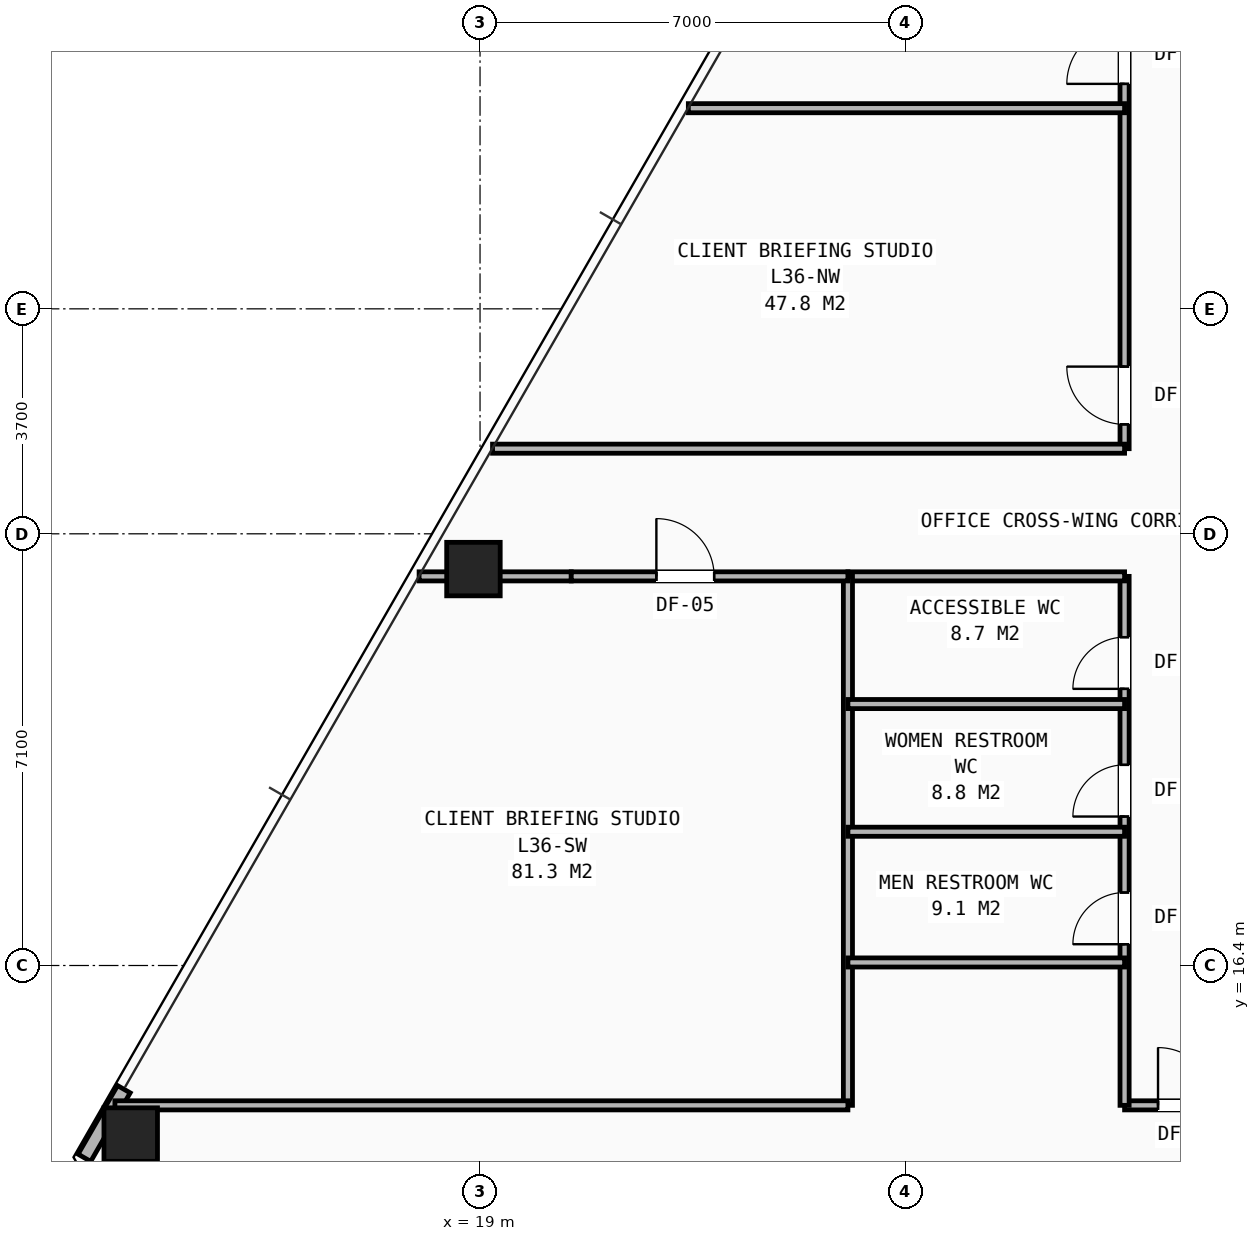
"""IFC4 building model, lengths in metres.
Left out: names, types, materials, properties, quantities, classifications, styles, units other than length and angle.
Written with IfcOpenShell. Run it as: python <this file> out.ifc"""

import sys

from ifc_helpers import new_model, si_unit, direction, frame, frame_2d, origin, origin_2d, place, context, subcontext, project, spatial, rectangle, hollow_rectangle, extrude, element, fill, save


model = new_model("IFC4")
c1 = context("Model", 3, precision=1e-05, world=origin(), true_north=direction((0.0, 1.0)))
c2 = subcontext(c1, "Body", "Model", "MODEL_VIEW")
j1 = project(units=[si_unit("LENGTHUNIT", "METRE"), si_unit("PLANEANGLEUNIT", "RADIAN")], contexts=[c1])
p1 = place(None, origin())
s1 = spatial("IfcSite", under=j1, at=p1, CompositionType="ELEMENT")
p2 = place(p1, origin())
s2 = spatial("IfcBuilding", under=s1, at=p2, CompositionType="ELEMENT")
p3 = place(p2, frame((0.0, 0.0, 126.35)))
s3 = spatial("IfcBuildingStorey", under=s2, at=p3, CompositionType="ELEMENT", Elevation=126.35)
for number, where, z_axis, x_axis in (
    (1, (18.892, 22.92, 0.0), (0.0, 0.0, 1.0), (1.0, 0.0, 0.0)),
    (2, (13.255, 13.619, 0.0), (0.0, 0.0, 1.0), (1.0, 0.0, 0.0)),
):
    element("IfcColumn", number, at=place(p3, frame(where, z_axis=z_axis, x_axis=x_axis)), inside=s3, PredefinedType="COLUMN", context=c2, shape_type="SweptSolid", body=[
        extrude(hollow_rectangle(XDim=0.88, YDim=0.88, WallThickness=0.06, at=origin_2d()), origin(), (0.0, 0.0, 1.0), 3.45),
    ])
p4 = place(p3, frame((13.142, 14.365, 0.0), z_axis=(0.0, 0.0, 1.0), x_axis=(-0.498460550087, -0.86691238312, 0.0)))
e3 = element("IfcWall", 3, at=p4, inside=s3, PredefinedType="SHEAR", context=c2, shape_type="SweptSolid", body=[
    extrude(rectangle(XDim=1.301, YDim=0.24, at=frame_2d((0.651, 0.0))), origin(), (0.0, 0.0, 1.0), 2.583),
])
p5 = place(p3, frame((29.6, 14.1, 0.0), z_axis=(0.0, 0.0, 1.0), x_axis=(1.0, 0.0, 0.0)))
e4 = element("IfcWall", 4, at=p5, inside=s3, PredefinedType="PARTITIONING", context=c2, shape_type="SweptSolid", body=[
    extrude(rectangle(XDim=18.6, YDim=0.15, at=frame_2d((9.3, 0.0))), origin(), (0.0, 0.0, 1.0), 2.225),
])
p6 = place(p5, frame((0.55, 0.0, 0.0)))
e5 = element("IfcOpeningElement", 5, at=p6, cuts=e4, PredefinedType="OPENING", context=c2, shape_type="SweptSolid", body=[
    extrude(rectangle(XDim=0.95, YDim=2.1, at=frame_2d((0.475, 1.05))), frame((0.0, 0.085, 0.0), z_axis=(0.0, -1.0, 0.0), x_axis=(1.0, 0.0, 0.0)), (0.0, 0.0, 1.0), 0.17),
])
p7 = place(p5, frame((7.25, 0.0, 0.0)))
e6 = element("IfcOpeningElement", 6, at=p7, cuts=e4, PredefinedType="OPENING", context=c2, shape_type="SweptSolid", body=[
    extrude(rectangle(XDim=0.95, YDim=2.1, at=frame_2d((0.475, 1.05))), frame((0.0, 0.085, 0.0), z_axis=(0.0, -1.0, 0.0), x_axis=(1.0, 0.0, 0.0)), (0.0, 0.0, 1.0), 0.17),
])
p8 = place(p5, frame((13.75, 0.0, 0.0)))
e7 = element("IfcOpeningElement", 7, at=p8, cuts=e4, PredefinedType="OPENING", context=c2, shape_type="SweptSolid", body=[
    extrude(rectangle(XDim=0.95, YDim=2.1, at=frame_2d((0.475, 1.05))), frame((0.0, 0.085, 0.0), z_axis=(0.0, -1.0, 0.0), x_axis=(1.0, 0.0, 0.0)), (0.0, 0.0, 1.0), 0.17),
])
p9 = place(p3, frame((29.6, 14.1, 0.0), z_axis=(0.0, 0.0, 1.0), x_axis=(0.0, 1.0, 0.0)))
e8 = element("IfcWall", 8, at=p9, inside=s3, PredefinedType="PARTITIONING", context=c2, shape_type="SweptSolid", body=[
    extrude(rectangle(XDim=8.7, YDim=0.15, at=frame_2d((4.35, 0.0))), origin(), (0.0, 0.0, 1.0), 3.21),
])
p10 = place(p9, frame((2.65, 0.0, 0.0)))
e9 = element("IfcOpeningElement", 9, at=p10, cuts=e8, PredefinedType="OPENING", context=c2, shape_type="SweptSolid", body=[
    extrude(rectangle(XDim=0.85, YDim=2.05, at=frame_2d((0.425, 1.025))), frame((0.0, 0.085, 0.0), z_axis=(0.0, -1.0, 0.0), x_axis=(1.0, 0.0, 0.0)), (0.0, 0.0, 1.0), 0.17),
])
p11 = place(p9, frame((4.75, 0.0, 0.0)))
e10 = element("IfcOpeningElement", 10, at=p11, cuts=e8, PredefinedType="OPENING", context=c2, shape_type="SweptSolid", body=[
    extrude(rectangle(XDim=0.85, YDim=2.05, at=frame_2d((0.425, 1.025))), frame((0.0, 0.085, 0.0), z_axis=(0.0, -1.0, 0.0), x_axis=(1.0, 0.0, 0.0)), (0.0, 0.0, 1.0), 0.17),
])
p12 = place(p9, frame((6.85, 0.0, 0.0)))
e11 = element("IfcOpeningElement", 11, at=p12, cuts=e8, PredefinedType="OPENING", context=c2, shape_type="SweptSolid", body=[
    extrude(rectangle(XDim=0.85, YDim=2.05, at=frame_2d((0.425, 1.025))), frame((0.0, 0.085, 0.0), z_axis=(0.0, -1.0, 0.0), x_axis=(1.0, 0.0, 0.0)), (0.0, 0.0, 1.0), 0.17),
])
p13 = place(p3, frame((29.6, 24.9, 0.0), z_axis=(0.0, 0.0, 1.0), x_axis=(0.0, 1.0, 0.0)))
e12 = element("IfcWall", 12, at=p13, inside=s3, PredefinedType="PARTITIONING", context=c2, shape_type="SweptSolid", body=[
    extrude(rectangle(XDim=13.9, YDim=0.15, at=frame_2d((6.95, 0.0))), origin(), (0.0, 0.0, 1.0), 2.225),
])
p14 = place(p13, frame((0.4, 0.0, 0.0)))
e13 = element("IfcOpeningElement", 13, at=p14, cuts=e12, PredefinedType="OPENING", context=c2, shape_type="SweptSolid", body=[
    extrude(rectangle(XDim=0.95, YDim=2.1, at=frame_2d((0.475, 1.05))), frame((0.0, 0.085, 0.0), z_axis=(0.0, -1.0, 0.0), x_axis=(1.0, 0.0, 0.0)), (0.0, 0.0, 1.0), 0.17),
])
p15 = place(p13, frame((6.0, 0.0, 0.0)))
e14 = element("IfcOpeningElement", 14, at=p15, cuts=e12, PredefinedType="OPENING", context=c2, shape_type="SweptSolid", body=[
    extrude(rectangle(XDim=0.95, YDim=2.1, at=frame_2d((0.475, 1.05))), frame((0.0, 0.085, 0.0), z_axis=(0.0, -1.0, 0.0), x_axis=(1.0, 0.0, 0.0)), (0.0, 0.0, 1.0), 0.17),
])
p16 = place(p3, frame((17.998, 22.8, 0.0), z_axis=(0.0, 0.0, 1.0), x_axis=(1.0, 0.0, 0.0)))
e15 = element("IfcWall", 15, at=p16, inside=s3, PredefinedType="PARTITIONING", context=c2, shape_type="SweptSolid", body=[
    extrude(rectangle(XDim=2.502, YDim=0.15, at=frame_2d((1.251, 0.0))), origin(), (0.0, 0.0, 1.0), 2.589),
])
p17 = place(p3, frame((25.05, 22.8, 0.0), z_axis=(0.0, 0.0, 1.0), x_axis=(1.0, 0.0, 0.0)))
e16 = element("IfcWall", 16, at=p17, inside=s3, PredefinedType="PARTITIONING", context=c2, shape_type="SweptSolid", body=[
    extrude(rectangle(XDim=4.55, YDim=0.15, at=frame_2d((2.275, 0.0))), origin(), (0.0, 0.0, 1.0), 3.21),
])
p18 = place(p3, frame((19.206, 24.9, 0.0), z_axis=(0.0, 0.0, 1.0), x_axis=(1.0, 0.0, 0.0)))
e17 = element("IfcWall", 17, at=p18, inside=s3, PredefinedType="PARTITIONING", context=c2, shape_type="SweptSolid", body=[
    extrude(rectangle(XDim=10.395, YDim=0.15, at=frame_2d((5.197, 0.0))), origin(), (0.0, 0.0, 1.0), 2.589),
])
p19 = place(p3, frame((25.05, 14.1, 0.0), z_axis=(0.0, 0.0, 1.0), x_axis=(0.0, 1.0, 0.0)))
e18 = element("IfcWall", 18, at=p19, inside=s3, PredefinedType="PARTITIONING", context=c2, shape_type="SweptSolid", body=[
    extrude(rectangle(XDim=8.7, YDim=0.15, at=frame_2d((4.35, 0.0))), origin(), (0.0, 0.0, 1.0), 3.21),
])
for number, where, z_axis, x_axis in (
    (19, (25.05, 16.45, 0.0), (0.0, 0.0, 1.0), (1.0, 0.0, 0.0)),
    (20, (25.05, 18.6, 0.0), (0.0, 0.0, 1.0), (1.0, 0.0, 0.0)),
    (21, (25.05, 20.7, 0.0), (0.0, 0.0, 1.0), (1.0, 0.0, 0.0)),
):
    element("IfcWall", number, at=place(p3, frame(where, z_axis=z_axis, x_axis=x_axis)), inside=s3, PredefinedType="PARTITIONING", context=c2, shape_type="SweptSolid", body=[
        extrude(rectangle(XDim=4.55, YDim=0.15, at=frame_2d((2.275, 0.0))), origin(), (0.0, 0.0, 1.0), 3.21),
    ])
p20 = place(p3, frame((12.995, 14.1, 0.0), z_axis=(0.0, 0.0, 1.0), x_axis=(1.0, 0.0, 0.0)))
e22 = element("IfcWall", 22, at=p20, inside=s3, PredefinedType="PARTITIONING", context=c2, shape_type="SweptSolid", body=[
    extrude(rectangle(XDim=12.055, YDim=0.15, at=frame_2d((6.027, 0.0))), origin(), (0.0, 0.0, 1.0), 2.589),
])
p21 = place(p3, frame((20.5, 22.8, 0.0), z_axis=(0.0, 0.0, 1.0), x_axis=(1.0, 0.0, 0.0)))
e23 = element("IfcWall", 23, at=p21, inside=s3, PredefinedType="PARTITIONING", context=c2, shape_type="SweptSolid", body=[
    extrude(rectangle(XDim=4.55, YDim=0.15, at=frame_2d((2.275, 0.0))), origin(), (0.0, 0.0, 1.0), 3.21),
])
p22 = place(p21, frame((1.4, 0.0, 0.0)))
e24 = element("IfcOpeningElement", 24, at=p22, cuts=e23, PredefinedType="OPENING", context=c2, shape_type="SweptSolid", body=[
    extrude(rectangle(XDim=0.95, YDim=2.1, at=frame_2d((0.475, 1.05))), frame((0.0, 0.085, 0.0), z_axis=(0.0, -1.0, 0.0), x_axis=(1.0, 0.0, 0.0)), (0.0, 0.0, 1.0), 0.17),
])
p23 = place(p3, frame((22.426, 30.5, 0.0), z_axis=(0.0, 0.0, 1.0), x_axis=(1.0, 0.0, 0.0)))
e25 = element("IfcWall", 25, at=p23, inside=s3, PredefinedType="PARTITIONING", context=c2, shape_type="SweptSolid", body=[
    extrude(rectangle(XDim=7.175, YDim=0.15, at=frame_2d((3.587, 0.0))), origin(), (0.0, 0.0, 1.0), 2.589),
])
p24 = place(p10, origin())
e26 = element("IfcDoor", 26, at=p24, inside=s3, OperationType="SINGLE_SWING_LEFT", PredefinedType="DOOR", context=c2, shape_type="SweptSolid", body=[
    extrude(rectangle(XDim=0.85, YDim=2.05, at=frame_2d((0.425, 1.025))), frame((0.0, 0.025, 0.0), z_axis=(0.0, -1.0, 0.0), x_axis=(1.0, 0.0, 0.0)), (0.0, 0.0, 1.0), 0.05),
])
fill(e9, e26)
p25 = place(p11, origin())
e27 = element("IfcDoor", 27, at=p25, inside=s3, OperationType="SINGLE_SWING_LEFT", PredefinedType="DOOR", context=c2, shape_type="SweptSolid", body=[
    extrude(rectangle(XDim=0.85, YDim=2.05, at=frame_2d((0.425, 1.025))), frame((0.0, 0.025, 0.0), z_axis=(0.0, -1.0, 0.0), x_axis=(1.0, 0.0, 0.0)), (0.0, 0.0, 1.0), 0.05),
])
fill(e10, e27)
p26 = place(p12, origin())
e28 = element("IfcDoor", 28, at=p26, inside=s3, OperationType="SINGLE_SWING_LEFT", PredefinedType="DOOR", context=c2, shape_type="SweptSolid", body=[
    extrude(rectangle(XDim=0.85, YDim=2.05, at=frame_2d((0.425, 1.025))), frame((0.0, 0.025, 0.0), z_axis=(0.0, -1.0, 0.0), x_axis=(1.0, 0.0, 0.0)), (0.0, 0.0, 1.0), 0.05),
])
fill(e11, e28)
p27 = place(p6, origin())
e29 = element("IfcDoor", 29, at=p27, inside=s3, OperationType="SINGLE_SWING_LEFT", PredefinedType="DOOR", context=c2, shape_type="SweptSolid", body=[
    extrude(rectangle(XDim=0.95, YDim=2.1, at=frame_2d((0.475, 1.05))), frame((0.0, 0.025, 0.0), z_axis=(0.0, -1.0, 0.0), x_axis=(1.0, 0.0, 0.0)), (0.0, 0.0, 1.0), 0.05),
])
fill(e5, e29)
p28 = place(p22, origin())
e30 = element("IfcDoor", 30, at=p28, inside=s3, OperationType="SINGLE_SWING_LEFT", PredefinedType="DOOR", context=c2, shape_type="SweptSolid", body=[
    extrude(rectangle(XDim=0.95, YDim=2.1, at=frame_2d((0.475, 1.05))), frame((0.0, 0.025, 0.0), z_axis=(0.0, -1.0, 0.0), x_axis=(1.0, 0.0, 0.0)), (0.0, 0.0, 1.0), 0.05),
])
fill(e24, e30)
p29 = place(p14, origin())
e31 = element("IfcDoor", 31, at=p29, inside=s3, OperationType="SINGLE_SWING_RIGHT", PredefinedType="DOOR", context=c2, shape_type="SweptSolid", body=[
    extrude(rectangle(XDim=0.95, YDim=2.1, at=frame_2d((0.475, 1.05))), frame((0.0, 0.025, 0.0), z_axis=(0.0, -1.0, 0.0), x_axis=(1.0, 0.0, 0.0)), (0.0, 0.0, 1.0), 0.05),
])
fill(e13, e31)
p30 = place(p15, origin())
e32 = element("IfcDoor", 32, at=p30, inside=s3, OperationType="SINGLE_SWING_LEFT", PredefinedType="DOOR", context=c2, shape_type="SweptSolid", body=[
    extrude(rectangle(XDim=0.95, YDim=2.1, at=frame_2d((0.475, 1.05))), frame((0.0, 0.025, 0.0), z_axis=(0.0, -1.0, 0.0), x_axis=(1.0, 0.0, 0.0)), (0.0, 0.0, 1.0), 0.05),
])
fill(e14, e32)
save(model, sys.argv[1])
